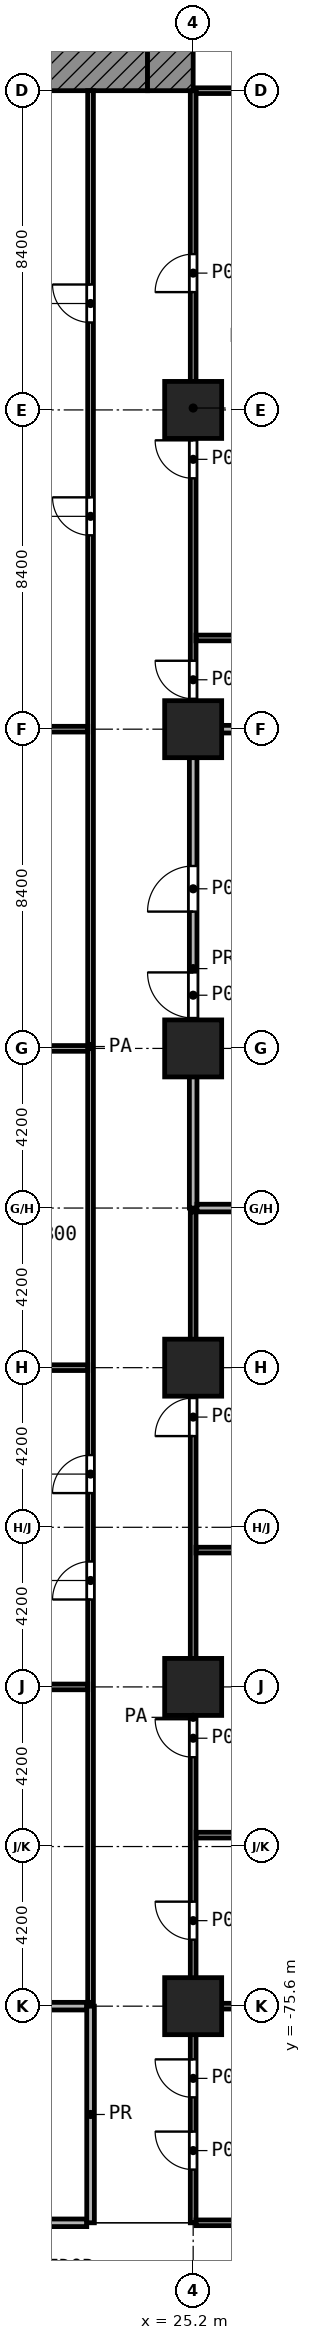
"""IFC4 building model, lengths in metres.
Left out: names, types, materials, properties, quantities, classifications, styles, units other than length and angle.
Written with IfcOpenShell. Run it as: python <this file> out.ifc"""

import sys

from ifc_helpers import new_model, si_unit, direction, frame, frame_2d, origin, origin_2d, place, context, subcontext, project, spatial, rectangle, extrude, element, fill, save


model = new_model("IFC4")
c1 = context("Model", 3, precision=1e-05, world=origin(), true_north=direction((0.0, 1.0)))
c2 = subcontext(c1, "Body", "Model", "MODEL_VIEW")
j1 = project(units=[si_unit("LENGTHUNIT", "METRE"), si_unit("PLANEANGLEUNIT", "RADIAN")], contexts=[c1])
p1 = place(None, origin())
s1 = spatial("IfcSite", under=j1, at=p1, CompositionType="ELEMENT")
p2 = place(p1, origin())
s2 = spatial("IfcBuilding", under=s1, at=p2, CompositionType="ELEMENT")
p3 = place(p2, frame((0.0, 0.0, 23.8)))
s3 = spatial("IfcBuildingStorey", under=s2, at=p3, CompositionType="ELEMENT", Elevation=23.8)
for number, where, z_axis, x_axis in (
    (1, (25.2, -33.6, 0.0), (0.0, 0.0, 1.0), (1.0, 0.0, 0.0)),
    (2, (25.2, -42.0, 0.0), (0.0, 0.0, 1.0), (1.0, 0.0, 0.0)),
    (3, (25.2, -50.4, 0.0), (0.0, 0.0, 1.0), (1.0, 0.0, 0.0)),
    (4, (25.2, -58.8, 0.0), (0.0, 0.0, 1.0), (1.0, 0.0, 0.0)),
    (5, (25.2, -67.2, 0.0), (0.0, 0.0, 1.0), (1.0, 0.0, 0.0)),
    (6, (25.2, -75.6, 0.0), (0.0, 0.0, 1.0), (1.0, 0.0, 0.0)),
):
    element("IfcColumn", number, at=place(p3, frame(where, z_axis=z_axis, x_axis=x_axis)), inside=s3, PredefinedType="COLUMN", context=c2, shape_type="SweptSolid", body=[
        extrude(rectangle(XDim=1.5, YDim=1.5, at=origin_2d()), origin(), (0.0, 0.0, 1.0), 5.2),
    ])
p4 = place(p3, frame((5.4, -24.6, 0.0), z_axis=(0.0, 0.0, 1.0), x_axis=(1.0, 0.0, 0.0)))
e7 = element("IfcWall", 7, at=p4, inside=s3, PredefinedType="SHEAR", context=c2, shape_type="SweptSolid", body=[
    extrude(rectangle(XDim=18.6, YDim=1.2, at=frame_2d((9.3, 0.0))), origin(), (0.0, 0.0, 1.0), 4.85),
])
p5 = place(p4, frame((6.3, 0.0, 0.0)))
e8 = element("IfcOpeningElement", 8, at=p5, cuts=e7, PredefinedType="OPENING", context=c2, shape_type="SweptSolid", body=[
    extrude(rectangle(XDim=1.8, YDim=2.1, at=frame_2d((0.9, 1.05))), frame((0.0, 0.61, 0.0), z_axis=(0.0, -1.0, 0.0), x_axis=(1.0, 0.0, 0.0)), (0.0, 0.0, 1.0), 1.22),
])
p6 = place(p3, frame((24.6, -25.2, 0.0), z_axis=(0.0, 0.0, 1.0), x_axis=(0.0, 1.0, 0.0)))
e9 = element("IfcWall", 9, at=p6, inside=s3, PredefinedType="SHEAR", context=c2, shape_type="SweptSolid", body=[
    extrude(rectangle(XDim=1.2, YDim=1.2, at=frame_2d((0.6, 0.0))), origin(), (0.0, 0.0, 1.0), 4.85),
])
p7 = place(p3, frame((25.275, -81.3, 0.0), z_axis=(0.0, 0.0, 1.0), x_axis=(1.0, 0.0, 0.0)))
e10 = element("IfcWall", 10, at=p7, inside=s3, PredefinedType="PARTITIONING", context=c2, shape_type="SweptSolid", body=[
    extrude(rectangle(XDim=3.15, YDim=0.15, at=frame_2d((1.575, 0.0))), origin(), (0.0, 0.0, 1.0), 4.85),
])
for number, where, z_axis, x_axis in (
    (11, (25.275, -75.6, 0.0), (0.0, 0.0, 1.0), (1.0, 0.0, 0.0)),
    (12, (25.275, -71.1, 0.0), (0.0, 0.0, 1.0), (1.0, 0.0, 0.0)),
):
    element("IfcWall", number, at=place(p3, frame(where, z_axis=z_axis, x_axis=x_axis)), inside=s3, PredefinedType="PARTITIONING", context=c2, shape_type="SweptSolid", body=[
        extrude(rectangle(XDim=11.205, YDim=0.15, at=frame_2d((5.603, 0.0))), origin(), (0.0, 0.0, 1.0), 3.45),
    ])
p8 = place(p3, frame((11.175, -67.2, 0.0), z_axis=(0.0, 0.0, 1.0), x_axis=(1.0, 0.0, 0.0)))
e13 = element("IfcWall", 13, at=p8, inside=s3, PredefinedType="PARTITIONING", context=c2, shape_type="SweptSolid", body=[
    extrude(rectangle(XDim=11.25, YDim=0.15, at=frame_2d((5.625, 0.0))), origin(), (0.0, 0.0, 1.0), 4.85),
])
p9 = place(p3, frame((25.275, -63.6, 0.0), z_axis=(0.0, 0.0, 1.0), x_axis=(1.0, 0.0, 0.0)))
e14 = element("IfcWall", 14, at=p9, inside=s3, PredefinedType="PARTITIONING", context=c2, shape_type="SweptSolid", body=[
    extrude(rectangle(XDim=11.205, YDim=0.15, at=frame_2d((5.603, 0.0))), origin(), (0.0, 0.0, 1.0), 3.45),
])
for number, where, z_axis, x_axis in (
    (15, (11.175, -58.8, 0.0), (0.0, 0.0, 1.0), (1.0, 0.0, 0.0)),
    (16, (11.175, -50.4, 0.0), (0.0, 0.0, 1.0), (1.0, 0.0, 0.0)),
    (17, (11.175, -42.0, 0.0), (0.0, 0.0, 1.0), (1.0, 0.0, 0.0)),
):
    element("IfcWall", number, at=place(p3, frame(where, z_axis=z_axis, x_axis=x_axis)), inside=s3, PredefinedType="PARTITIONING", context=c2, shape_type="SweptSolid", body=[
        extrude(rectangle(XDim=11.25, YDim=0.15, at=frame_2d((5.625, 0.0))), origin(), (0.0, 0.0, 1.0), 4.85),
    ])
p10 = place(p3, frame((25.275, -39.6, 0.0), z_axis=(0.0, 0.0, 1.0), x_axis=(1.0, 0.0, 0.0)))
e18 = element("IfcWall", 18, at=p10, inside=s3, PredefinedType="PARTITIONING", context=c2, shape_type="SweptSolid", body=[
    extrude(rectangle(XDim=14.272, YDim=0.15, at=frame_2d((7.136, 0.0))), origin(), (0.0, 0.0, 1.0), 4.85),
])
p11 = place(p3, frame((25.275, -25.2, 0.0), z_axis=(0.0, 0.0, 1.0), x_axis=(1.0, 0.0, 0.0)))
e19 = element("IfcWall", 19, at=p11, inside=s3, PredefinedType="PARTITIONING", context=c2, shape_type="SweptSolid", body=[
    extrude(rectangle(XDim=33.425, YDim=0.15, at=frame_2d((16.712, 0.0))), origin(), (0.0, 0.0, 1.0), 4.85),
])
p12 = place(p11, frame((13.425, 0.0, 0.0)))
e20 = element("IfcOpeningElement", 20, at=p12, cuts=e19, PredefinedType="OPENING", context=c2, shape_type="SweptSolid", body=[
    extrude(rectangle(XDim=1.0, YDim=2.1, at=frame_2d((0.5, 1.05))), frame((0.0, 0.085, 0.0), z_axis=(0.0, -1.0, 0.0), x_axis=(1.0, 0.0, 0.0)), (0.0, 0.0, 1.0), 0.17),
])
p13 = place(p11, frame((10.625, 0.0, 0.0)))
e21 = element("IfcOpeningElement", 21, at=p13, cuts=e19, PredefinedType="OPENING", context=c2, shape_type="SweptSolid", body=[
    extrude(rectangle(XDim=1.0, YDim=2.1, at=frame_2d((0.5, 1.05))), frame((0.0, 0.085, 0.0), z_axis=(0.0, -1.0, 0.0), x_axis=(1.0, 0.0, 0.0)), (0.0, 0.0, 1.0), 0.17),
])
p14 = place(p11, frame((21.825, 0.0, 0.0)))
e22 = element("IfcOpeningElement", 22, at=p14, cuts=e19, PredefinedType="OPENING", context=c2, shape_type="SweptSolid", body=[
    extrude(rectangle(XDim=1.0, YDim=2.1, at=frame_2d((0.5, 1.05))), frame((0.0, 0.085, 0.0), z_axis=(0.0, -1.0, 0.0), x_axis=(1.0, 0.0, 0.0)), (0.0, 0.0, 1.0), 0.17),
])
p15 = place(p11, frame((19.025, 0.0, 0.0)))
e23 = element("IfcOpeningElement", 23, at=p15, cuts=e19, PredefinedType="OPENING", context=c2, shape_type="SweptSolid", body=[
    extrude(rectangle(XDim=1.0, YDim=2.1, at=frame_2d((0.5, 1.05))), frame((0.0, 0.085, 0.0), z_axis=(0.0, -1.0, 0.0), x_axis=(1.0, 0.0, 0.0)), (0.0, 0.0, 1.0), 0.17),
])
p16 = place(p11, frame((28.825, 0.0, 0.0)))
e24 = element("IfcOpeningElement", 24, at=p16, cuts=e19, PredefinedType="OPENING", context=c2, shape_type="SweptSolid", body=[
    extrude(rectangle(XDim=1.0, YDim=2.1, at=frame_2d((0.5, 1.05))), frame((0.0, 0.085, 0.0), z_axis=(0.0, -1.0, 0.0), x_axis=(1.0, 0.0, 0.0)), (0.0, 0.0, 1.0), 0.17),
])
p17 = place(p3, frame((22.5, -75.5, 0.0), z_axis=(0.0, 0.0, 1.0), x_axis=(0.0, 1.0, 0.0)))
e25 = element("IfcWall", 25, at=p17, inside=s3, PredefinedType="PARTITIONING", context=c2, shape_type="SweptSolid", body=[
    extrude(rectangle(XDim=50.3, YDim=0.15, at=frame_2d((25.15, 0.0))), origin(), (0.0, 0.0, 1.0), 4.85),
])
p18 = place(p17, frame((38.6, 0.0, 0.0)))
e26 = element("IfcOpeningElement", 26, at=p18, cuts=e25, PredefinedType="OPENING", context=c2, shape_type="SweptSolid", body=[
    extrude(rectangle(XDim=1.0, YDim=2.1, at=frame_2d((0.5, 1.05))), frame((0.0, 0.085, 0.0), z_axis=(0.0, -1.0, 0.0), x_axis=(1.0, 0.0, 0.0)), (0.0, 0.0, 1.0), 0.17),
])
p19 = place(p17, frame((44.2, 0.0, 0.0)))
e27 = element("IfcOpeningElement", 27, at=p19, cuts=e25, PredefinedType="OPENING", context=c2, shape_type="SweptSolid", body=[
    extrude(rectangle(XDim=1.0, YDim=2.1, at=frame_2d((0.5, 1.05))), frame((0.0, 0.085, 0.0), z_axis=(0.0, -1.0, 0.0), x_axis=(1.0, 0.0, 0.0)), (0.0, 0.0, 1.0), 0.17),
])
p20 = place(p17, frame((10.6, 0.0, 0.0)))
e28 = element("IfcOpeningElement", 28, at=p20, cuts=e25, PredefinedType="OPENING", context=c2, shape_type="SweptSolid", body=[
    extrude(rectangle(XDim=1.0, YDim=2.1, at=frame_2d((0.5, 1.05))), frame((0.0, 0.085, 0.0), z_axis=(0.0, -1.0, 0.0), x_axis=(1.0, 0.0, 0.0)), (0.0, 0.0, 1.0), 0.17),
])
p21 = place(p17, frame((13.4, 0.0, 0.0)))
e29 = element("IfcOpeningElement", 29, at=p21, cuts=e25, PredefinedType="OPENING", context=c2, shape_type="SweptSolid", body=[
    extrude(rectangle(XDim=1.0, YDim=2.1, at=frame_2d((0.5, 1.05))), frame((0.0, 0.085, 0.0), z_axis=(0.0, -1.0, 0.0), x_axis=(1.0, 0.0, 0.0)), (0.0, 0.0, 1.0), 0.17),
])
p22 = place(p3, frame((25.2, -81.3, 0.0), z_axis=(0.0, 0.0, 1.0), x_axis=(0.0, 1.0, 0.0)))
e30 = element("IfcWall", 30, at=p22, inside=s3, PredefinedType="PARTITIONING", context=c2, shape_type="SweptSolid", body=[
    extrude(rectangle(XDim=26.6, YDim=0.15, at=frame_2d((13.3, 0.0))), origin(), (0.0, 0.0, 1.0), 4.85),
])
p23 = place(p22, frame((20.7, 0.0, 0.0)))
e31 = element("IfcOpeningElement", 31, at=p23, cuts=e30, PredefinedType="OPENING", context=c2, shape_type="SweptSolid", body=[
    extrude(rectangle(XDim=1.0, YDim=2.1, at=frame_2d((0.5, 1.05))), frame((0.0, 0.085, 0.0), z_axis=(0.0, -1.0, 0.0), x_axis=(1.0, 0.0, 0.0)), (0.0, 0.0, 1.0), 0.17),
])
p24 = place(p22, frame((12.25, 0.0, 0.0)))
e32 = element("IfcOpeningElement", 32, at=p24, cuts=e30, PredefinedType="OPENING", context=c2, shape_type="SweptSolid", body=[
    extrude(rectangle(XDim=1.0, YDim=2.1, at=frame_2d((0.5, 1.05))), frame((0.0, 0.085, 0.0), z_axis=(0.0, -1.0, 0.0), x_axis=(1.0, 0.0, 0.0)), (0.0, 0.0, 1.0), 0.17),
])
p25 = place(p22, frame((7.45, 0.0, 0.0)))
e33 = element("IfcOpeningElement", 33, at=p25, cuts=e30, PredefinedType="OPENING", context=c2, shape_type="SweptSolid", body=[
    extrude(rectangle(XDim=1.0, YDim=2.1, at=frame_2d((0.5, 1.05))), frame((0.0, 0.085, 0.0), z_axis=(0.0, -1.0, 0.0), x_axis=(1.0, 0.0, 0.0)), (0.0, 0.0, 1.0), 0.17),
])
p26 = place(p22, frame((3.3, 0.0, 0.0)))
e34 = element("IfcOpeningElement", 34, at=p26, cuts=e30, PredefinedType="OPENING", context=c2, shape_type="SweptSolid", body=[
    extrude(rectangle(XDim=1.0, YDim=2.1, at=frame_2d((0.5, 1.05))), frame((0.0, 0.085, 0.0), z_axis=(0.0, -1.0, 0.0), x_axis=(1.0, 0.0, 0.0)), (0.0, 0.0, 1.0), 0.17),
])
p27 = place(p22, frame((1.4, 0.0, 0.0)))
e35 = element("IfcOpeningElement", 35, at=p27, cuts=e30, PredefinedType="OPENING", context=c2, shape_type="SweptSolid", body=[
    extrude(rectangle(XDim=1.0, YDim=2.1, at=frame_2d((0.5, 1.05))), frame((0.0, 0.085, 0.0), z_axis=(0.0, -1.0, 0.0), x_axis=(1.0, 0.0, 0.0)), (0.0, 0.0, 1.0), 0.17),
])
p28 = place(p3, frame((25.2, -41.9, 0.0), z_axis=(0.0, 0.0, 1.0), x_axis=(0.0, 1.0, 0.0)))
e36 = element("IfcWall", 36, at=p28, inside=s3, PredefinedType="PARTITIONING", context=c2, shape_type="SweptSolid", body=[
    extrude(rectangle(XDim=16.7, YDim=0.15, at=frame_2d((8.35, 0.0))), origin(), (0.0, 0.0, 1.0), 4.85),
])
p29 = place(p28, frame((11.4, 0.0, 0.0)))
e37 = element("IfcOpeningElement", 37, at=p29, cuts=e36, PredefinedType="OPENING", context=c2, shape_type="SweptSolid", body=[
    extrude(rectangle(XDim=1.0, YDim=2.1, at=frame_2d((0.5, 1.05))), frame((0.0, 0.085, 0.0), z_axis=(0.0, -1.0, 0.0), x_axis=(1.0, 0.0, 0.0)), (0.0, 0.0, 1.0), 0.17),
])
p30 = place(p28, frame((6.5, 0.0, 0.0)))
e38 = element("IfcOpeningElement", 38, at=p30, cuts=e36, PredefinedType="OPENING", context=c2, shape_type="SweptSolid", body=[
    extrude(rectangle(XDim=1.0, YDim=2.1, at=frame_2d((0.5, 1.05))), frame((0.0, 0.085, 0.0), z_axis=(0.0, -1.0, 0.0), x_axis=(1.0, 0.0, 0.0)), (0.0, 0.0, 1.0), 0.17),
])
p31 = place(p28, frame((0.7, 0.0, 0.0)))
e39 = element("IfcOpeningElement", 39, at=p31, cuts=e36, PredefinedType="OPENING", context=c2, shape_type="SweptSolid", body=[
    extrude(rectangle(XDim=1.0, YDim=2.1, at=frame_2d((0.5, 1.05))), frame((0.0, 0.085, 0.0), z_axis=(0.0, -1.0, 0.0), x_axis=(1.0, 0.0, 0.0)), (0.0, 0.0, 1.0), 0.17),
])
p32 = place(p3, frame((11.2, -81.3, 0.0), z_axis=(0.0, 0.0, 1.0), x_axis=(1.0, 0.0, 0.0)))
e40 = element("IfcWall", 40, at=p32, inside=s3, PredefinedType="PARTITIONING", context=c2, shape_type="SweptSolid", body=[
    extrude(rectangle(XDim=11.2, YDim=0.2, at=frame_2d((5.6, 0.0))), origin(), (0.0, 0.0, 1.0), 4.85),
])
p33 = place(p32, frame((5.0, 0.0, 0.0)))
e41 = element("IfcOpeningElement", 41, at=p33, cuts=e40, PredefinedType="OPENING", context=c2, shape_type="SweptSolid", body=[
    extrude(rectangle(XDim=1.2, YDim=2.1, at=frame_2d((0.6, 1.05))), frame((0.0, 0.11, 0.0), z_axis=(0.0, -1.0, 0.0), x_axis=(1.0, 0.0, 0.0)), (0.0, 0.0, 1.0), 0.22),
])
p34 = place(p3, frame((11.2, -75.6, 0.0), z_axis=(0.0, 0.0, 1.0), x_axis=(1.0, 0.0, 0.0)))
e42 = element("IfcWall", 42, at=p34, inside=s3, PredefinedType="PARTITIONING", context=c2, shape_type="SweptSolid", body=[
    extrude(rectangle(XDim=11.2, YDim=0.2, at=frame_2d((5.6, 0.0))), origin(), (0.0, 0.0, 1.0), 4.85),
])
p35 = place(p3, frame((25.3, -54.6, 0.0), z_axis=(0.0, 0.0, 1.0), x_axis=(1.0, 0.0, 0.0)))
e43 = element("IfcWall", 43, at=p35, inside=s3, PredefinedType="PARTITIONING", context=c2, shape_type="SweptSolid", body=[
    extrude(rectangle(XDim=11.18, YDim=0.2, at=frame_2d((5.59, 0.0))), origin(), (0.0, 0.0, 1.0), 3.45),
])
p36 = place(p3, frame((25.3, -42.0, 0.0), z_axis=(0.0, 0.0, 1.0), x_axis=(1.0, 0.0, 0.0)))
e44 = element("IfcWall", 44, at=p36, inside=s3, PredefinedType="PARTITIONING", context=c2, shape_type="SweptSolid", body=[
    extrude(rectangle(XDim=11.787, YDim=0.2, at=frame_2d((5.894, 0.0))), origin(), (0.0, 0.0, 1.0), 3.45),
])
p37 = place(p3, frame((22.5, -81.3, 0.0), z_axis=(0.0, 0.0, 1.0), x_axis=(0.0, 1.0, 0.0)))
e45 = element("IfcWall", 45, at=p37, inside=s3, PredefinedType="PARTITIONING", context=c2, shape_type="SweptSolid", body=[
    extrude(rectangle(XDim=5.7, YDim=0.2, at=frame_2d((2.85, 0.0))), origin(), (0.0, 0.0, 1.0), 4.85),
])
p38 = place(p3, frame((25.2, -54.6, 0.0), z_axis=(0.0, 0.0, 1.0), x_axis=(0.0, 1.0, 0.0)))
e46 = element("IfcWall", 46, at=p38, inside=s3, PredefinedType="PARTITIONING", context=c2, shape_type="SweptSolid", body=[
    extrude(rectangle(XDim=12.6, YDim=0.2, at=frame_2d((6.3, 0.0))), origin(), (0.0, 0.0, 1.0), 4.85),
])
p39 = place(p38, frame((7.8, 0.0, 0.0)))
e47 = element("IfcOpeningElement", 47, at=p39, cuts=e46, PredefinedType="OPENING", context=c2, shape_type="SweptSolid", body=[
    extrude(rectangle(XDim=1.2, YDim=2.1, at=frame_2d((0.6, 1.05))), frame((0.0, 0.11, 0.0), z_axis=(0.0, -1.0, 0.0), x_axis=(1.0, 0.0, 0.0)), (0.0, 0.0, 1.0), 0.22),
])
p40 = place(p38, frame((5.0, 0.0, 0.0)))
e48 = element("IfcOpeningElement", 48, at=p40, cuts=e46, PredefinedType="OPENING", context=c2, shape_type="SweptSolid", body=[
    extrude(rectangle(XDim=1.2, YDim=2.1, at=frame_2d((0.6, 1.05))), frame((0.0, 0.11, 0.0), z_axis=(0.0, -1.0, 0.0), x_axis=(1.0, 0.0, 0.0)), (0.0, 0.0, 1.0), 0.22),
])
p41 = place(p29, origin())
e49 = element("IfcDoor", 49, at=p41, inside=s3, OperationType="SINGLE_SWING_LEFT", PredefinedType="DOOR", context=c2, shape_type="SweptSolid", body=[
    extrude(rectangle(XDim=1.0, YDim=2.1, at=frame_2d((0.5, 1.05))), frame((0.0, 0.025, 0.0), z_axis=(0.0, -1.0, 0.0), x_axis=(1.0, 0.0, 0.0)), (0.0, 0.0, 1.0), 0.05),
])
fill(e37, e49)
p42 = place(p30, origin())
e50 = element("IfcDoor", 50, at=p42, inside=s3, OperationType="SINGLE_SWING_RIGHT", PredefinedType="DOOR", context=c2, shape_type="SweptSolid", body=[
    extrude(rectangle(XDim=1.0, YDim=2.1, at=frame_2d((0.5, 1.05))), frame((0.0, 0.025, 0.0), z_axis=(0.0, -1.0, 0.0), x_axis=(1.0, 0.0, 0.0)), (0.0, 0.0, 1.0), 0.05),
])
fill(e38, e50)
p43 = place(p18, origin())
e51 = element("IfcDoor", 51, at=p43, inside=s3, OperationType="SINGLE_SWING_RIGHT", PredefinedType="DOOR", context=c2, shape_type="SweptSolid", body=[
    extrude(rectangle(XDim=1.0, YDim=2.1, at=frame_2d((0.5, 1.05))), frame((0.0, 0.025, 0.0), z_axis=(0.0, -1.0, 0.0), x_axis=(1.0, 0.0, 0.0)), (0.0, 0.0, 1.0), 0.05),
])
fill(e26, e51)
p44 = place(p19, origin())
e52 = element("IfcDoor", 52, at=p44, inside=s3, OperationType="SINGLE_SWING_RIGHT", PredefinedType="DOOR", context=c2, shape_type="SweptSolid", body=[
    extrude(rectangle(XDim=1.0, YDim=2.1, at=frame_2d((0.5, 1.05))), frame((0.0, 0.025, 0.0), z_axis=(0.0, -1.0, 0.0), x_axis=(1.0, 0.0, 0.0)), (0.0, 0.0, 1.0), 0.05),
])
fill(e27, e52)
p45 = place(p20, origin())
e53 = element("IfcDoor", 53, at=p45, inside=s3, OperationType="SINGLE_SWING_LEFT", PredefinedType="DOOR", context=c2, shape_type="SweptSolid", body=[
    extrude(rectangle(XDim=1.0, YDim=2.1, at=frame_2d((0.5, 1.05))), frame((0.0, 0.025, 0.0), z_axis=(0.0, -1.0, 0.0), x_axis=(1.0, 0.0, 0.0)), (0.0, 0.0, 1.0), 0.05),
])
fill(e28, e53)
p46 = place(p21, origin())
e54 = element("IfcDoor", 54, at=p46, inside=s3, OperationType="SINGLE_SWING_LEFT", PredefinedType="DOOR", context=c2, shape_type="SweptSolid", body=[
    extrude(rectangle(XDim=1.0, YDim=2.1, at=frame_2d((0.5, 1.05))), frame((0.0, 0.025, 0.0), z_axis=(0.0, -1.0, 0.0), x_axis=(1.0, 0.0, 0.0)), (0.0, 0.0, 1.0), 0.05),
])
fill(e29, e54)
p47 = place(p31, origin())
e55 = element("IfcDoor", 55, at=p47, inside=s3, OperationType="SINGLE_SWING_RIGHT", PredefinedType="DOOR", context=c2, shape_type="SweptSolid", body=[
    extrude(rectangle(XDim=1.0, YDim=2.1, at=frame_2d((0.5, 1.05))), frame((0.0, 0.025, 0.0), z_axis=(0.0, -1.0, 0.0), x_axis=(1.0, 0.0, 0.0)), (0.0, 0.0, 1.0), 0.05),
])
fill(e39, e55)
p48 = place(p39, origin())
e56 = element("IfcDoor", 56, at=p48, inside=s3, OperationType="SINGLE_SWING_LEFT", PredefinedType="DOOR", context=c2, shape_type="SweptSolid", body=[
    extrude(rectangle(XDim=1.2, YDim=2.1, at=frame_2d((0.6, 1.05))), frame((0.0, 0.025, 0.0), z_axis=(0.0, -1.0, 0.0), x_axis=(1.0, 0.0, 0.0)), (0.0, 0.0, 1.0), 0.05),
])
fill(e47, e56)
p49 = place(p40, origin())
e57 = element("IfcDoor", 57, at=p49, inside=s3, OperationType="SINGLE_SWING_RIGHT", PredefinedType="DOOR", context=c2, shape_type="SweptSolid", body=[
    extrude(rectangle(XDim=1.2, YDim=2.1, at=frame_2d((0.6, 1.05))), frame((0.0, 0.025, 0.0), z_axis=(0.0, -1.0, 0.0), x_axis=(1.0, 0.0, 0.0)), (0.0, 0.0, 1.0), 0.05),
])
fill(e48, e57)
p50 = place(p23, origin())
e58 = element("IfcDoor", 58, at=p50, inside=s3, OperationType="SINGLE_SWING_LEFT", PredefinedType="DOOR", context=c2, shape_type="SweptSolid", body=[
    extrude(rectangle(XDim=1.0, YDim=2.1, at=frame_2d((0.5, 1.05))), frame((0.0, 0.025, 0.0), z_axis=(0.0, -1.0, 0.0), x_axis=(1.0, 0.0, 0.0)), (0.0, 0.0, 1.0), 0.05),
])
fill(e31, e58)
p51 = place(p24, origin())
e59 = element("IfcDoor", 59, at=p51, inside=s3, OperationType="SINGLE_SWING_RIGHT", PredefinedType="DOOR", context=c2, shape_type="SweptSolid", body=[
    extrude(rectangle(XDim=1.0, YDim=2.1, at=frame_2d((0.5, 1.05))), frame((0.0, 0.025, 0.0), z_axis=(0.0, -1.0, 0.0), x_axis=(1.0, 0.0, 0.0)), (0.0, 0.0, 1.0), 0.05),
])
fill(e32, e59)
p52 = place(p25, origin())
e60 = element("IfcDoor", 60, at=p52, inside=s3, OperationType="SINGLE_SWING_RIGHT", PredefinedType="DOOR", context=c2, shape_type="SweptSolid", body=[
    extrude(rectangle(XDim=1.0, YDim=2.1, at=frame_2d((0.5, 1.05))), frame((0.0, 0.025, 0.0), z_axis=(0.0, -1.0, 0.0), x_axis=(1.0, 0.0, 0.0)), (0.0, 0.0, 1.0), 0.05),
])
fill(e33, e60)
p53 = place(p26, origin())
e61 = element("IfcDoor", 61, at=p53, inside=s3, OperationType="SINGLE_SWING_RIGHT", PredefinedType="DOOR", context=c2, shape_type="SweptSolid", body=[
    extrude(rectangle(XDim=1.0, YDim=2.1, at=frame_2d((0.5, 1.05))), frame((0.0, 0.025, 0.0), z_axis=(0.0, -1.0, 0.0), x_axis=(1.0, 0.0, 0.0)), (0.0, 0.0, 1.0), 0.05),
])
fill(e34, e61)
p54 = place(p27, origin())
e62 = element("IfcDoor", 62, at=p54, inside=s3, OperationType="SINGLE_SWING_RIGHT", PredefinedType="DOOR", context=c2, shape_type="SweptSolid", body=[
    extrude(rectangle(XDim=1.0, YDim=2.1, at=frame_2d((0.5, 1.05))), frame((0.0, 0.025, 0.0), z_axis=(0.0, -1.0, 0.0), x_axis=(1.0, 0.0, 0.0)), (0.0, 0.0, 1.0), 0.05),
])
fill(e35, e62)
save(model, sys.argv[1])
